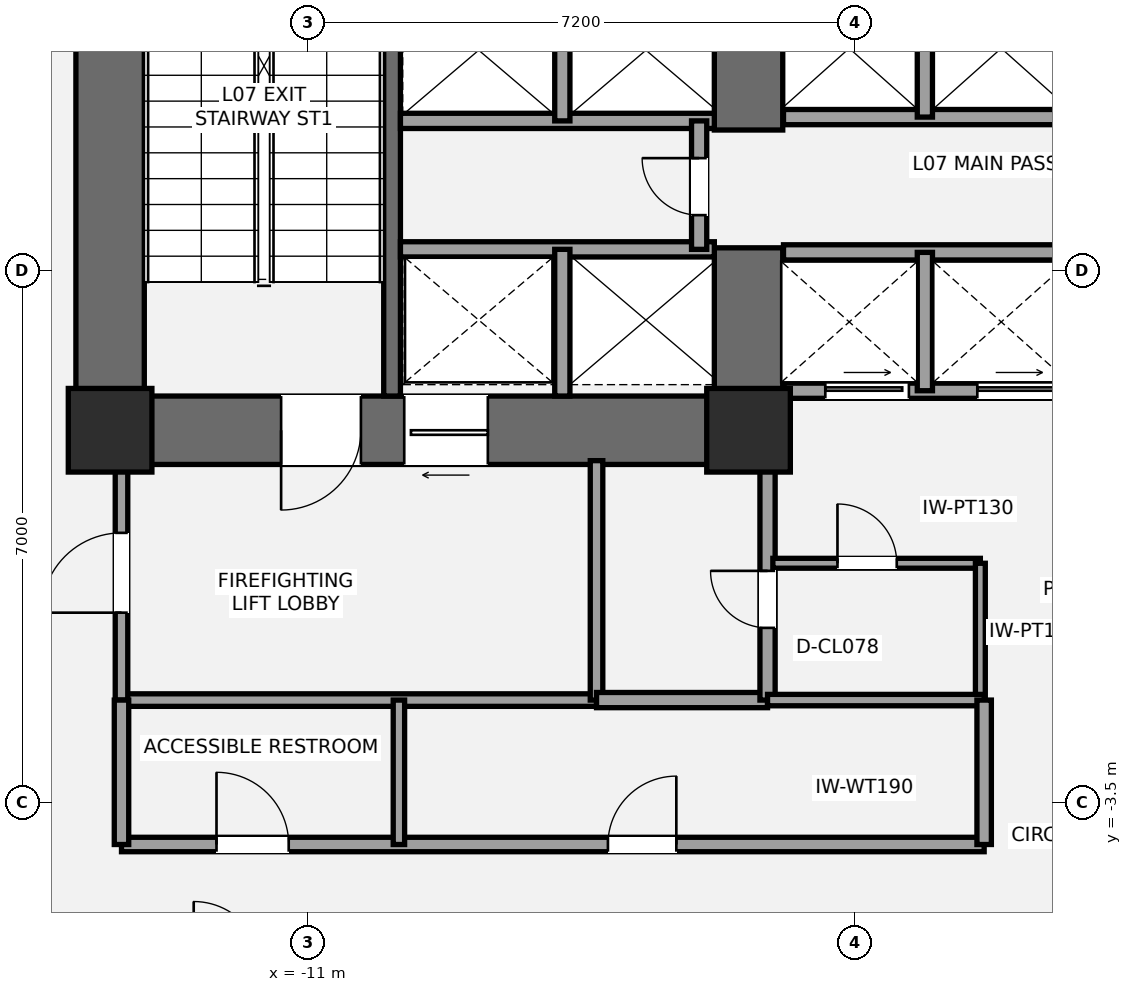
"""IFC4 building model, lengths in metres.
Left out: names, types, materials, properties, quantities, classifications, styles, units other than length and angle.
Written with IfcOpenShell. Run it as: python <this file> out.ifc"""

import sys

from ifc_helpers import new_model, si_unit, direction, frame, frame_2d, origin, origin_2d, place, context, subcontext, project, spatial, rectangle, extrude, element, fill, save


model = new_model("IFC4")
c1 = context("Model", 3, precision=1e-05, world=origin(), true_north=direction((0.0, 1.0)))
c2 = subcontext(c1, "Body", "Model", "MODEL_VIEW")
j1 = project(units=[si_unit("LENGTHUNIT", "METRE"), si_unit("PLANEANGLEUNIT", "RADIAN")], contexts=[c1])
p1 = place(None, origin())
s1 = spatial("IfcSite", under=j1, at=p1, CompositionType="ELEMENT")
p2 = place(p1, origin())
s2 = spatial("IfcBuilding", under=s1, at=p2, CompositionType="ELEMENT")
p3 = place(p2, frame((0.0, 0.0, 30.6)))
s3 = spatial("IfcBuildingStorey", under=s2, at=p3, CompositionType="ELEMENT", Elevation=30.6)
p4 = place(p3, frame((-13.6, 0.95, 0.0), z_axis=(0.0, 0.0, 1.0), x_axis=(0.0, 1.0, 0.0)))
e1 = element("IfcWall", 1, at=p4, inside=s3, PredefinedType="SHEAR", context=c2, shape_type="SweptSolid", body=[
    extrude(rectangle(XDim=8.95, YDim=0.9, at=frame_2d((4.475, 0.0))), origin(), (0.0, 0.0, 1.0), 3.6),
])
p5 = place(p3, frame((-4.75, 1.4, 0.0), z_axis=(0.0, 0.0, 1.0), x_axis=(-1.0, 0.0, 0.0)))
e2 = element("IfcWall", 2, at=p5, inside=s3, PredefinedType="SHEAR", context=c2, shape_type="SweptSolid", body=[
    extrude(rectangle(XDim=9.3, YDim=0.9, at=frame_2d((4.65, 0.0))), origin(), (0.0, 0.0, 1.0), 3.6),
])
p6 = place(p5, frame((5.55, 0.0, 0.0)))
e3 = element("IfcOpeningElement", 3, at=p6, cuts=e2, PredefinedType="OPENING", context=c2, shape_type="SweptSolid", body=[
    extrude(rectangle(XDim=1.05, YDim=2.15, at=frame_2d((0.525, 1.075))), frame((0.0, 0.46, 0.0), z_axis=(0.0, -1.0, 0.0), x_axis=(1.0, 0.0, 0.0)), (0.0, 0.0, 1.0), 0.92),
])
p7 = place(p5, frame((3.88, 0.0, 0.0)))
e4 = element("IfcOpeningElement", 4, at=p7, cuts=e2, PredefinedType="OPENING", context=c2, shape_type="SweptSolid", body=[
    extrude(rectangle(XDim=1.1, YDim=2.2, at=frame_2d((0.55, 1.1))), frame((0.0, 0.46, 0.0), z_axis=(0.0, -1.0, 0.0), x_axis=(1.0, 0.0, 0.0)), (0.0, 0.0, 1.0), 0.92),
])
p8 = place(p3, frame((-5.2, 0.95, 0.0), z_axis=(0.0, 0.0, 1.0), x_axis=(0.0, 1.0, 0.0)))
e5 = element("IfcWall", 5, at=p8, inside=s3, PredefinedType="SHEAR", context=c2, shape_type="SweptSolid", body=[
    extrude(rectangle(XDim=2.85, YDim=0.9, at=frame_2d((1.425, 0.0))), origin(), (0.0, 0.0, 1.0), 3.6),
])
p9 = place(p3, frame((-5.2, 5.35, 0.0), z_axis=(0.0, 0.0, 1.0), x_axis=(0.0, 1.0, 0.0)))
e6 = element("IfcWall", 6, at=p9, inside=s3, PredefinedType="SHEAR", context=c2, shape_type="SweptSolid", body=[
    extrude(rectangle(XDim=2.0, YDim=0.9, at=frame_2d((1.0, 0.0))), origin(), (0.0, 0.0, 1.0), 3.6),
])
p10 = place(p3, frame((-9.89, 1.85, 0.0), z_axis=(0.0, 0.0, 1.0), x_axis=(0.0, 1.0, 0.0)))
e7 = element("IfcWall", 7, at=p10, inside=s3, PredefinedType="SHEAR", context=c2, shape_type="SweptSolid", body=[
    extrude(rectangle(XDim=7.15, YDim=0.22, at=frame_2d((3.575, 0.0))), origin(), (0.0, 0.0, 1.0), 3.6),
])
for number, where, z_axis, x_axis in (
    (8, (-13.6, 1.4, 0.0), (0.0, 0.0, 1.0), (1.0, 0.0, 0.0)),
    (9, (-5.2, 1.4, 0.0), (0.0, 0.0, 1.0), (1.0, 0.0, 0.0)),
):
    element("IfcColumn", number, at=place(p3, frame(where, z_axis=z_axis, x_axis=x_axis)), inside=s3, PredefinedType="COLUMN", context=c2, shape_type="SweptSolid", body=[
        extrude(rectangle(XDim=1.1, YDim=1.1, at=origin_2d()), origin(), (0.0, 0.0, 1.0), 3.6),
    ])
p11 = place(p3, frame((-13.45, -2.15, 0.0), z_axis=(0.0, 0.0, 1.0), x_axis=(1.0, 0.0, 0.0)))
e10 = element("IfcWall", 10, at=p11, inside=s3, PredefinedType="PARTITIONING", context=c2, shape_type="SweptSolid", body=[
    extrude(rectangle(XDim=6.25, YDim=0.165, at=frame_2d((3.125, 0.0))), origin(), (0.0, 0.0, 1.0), 2.853),
])
p12 = place(p3, frame((-13.45, -2.15, 0.0), z_axis=(0.0, 0.0, 1.0), x_axis=(0.0, 1.0, 0.0)))
e11 = element("IfcWall", 11, at=p12, inside=s3, PredefinedType="PARTITIONING", context=c2, shape_type="SweptSolid", body=[
    extrude(rectangle(XDim=3.15, YDim=0.165, at=frame_2d((1.575, 0.0))), origin(), (0.0, 0.0, 1.0), 2.853),
])
p13 = place(p12, frame((1.15, 0.0, 0.0)))
e12 = element("IfcOpeningElement", 12, at=p13, cuts=e11, PredefinedType="OPENING", context=c2, shape_type="SweptSolid", body=[
    extrude(rectangle(XDim=1.05, YDim=2.15, at=frame_2d((0.525, 1.075))), frame((0.0, 0.093, 0.0), z_axis=(0.0, -1.0, 0.0), x_axis=(1.0, 0.0, 0.0)), (0.0, 0.0, 1.0), 0.185),
])
p14 = place(p3, frame((-7.2, -2.15, 0.0), z_axis=(0.0, 0.0, 1.0), x_axis=(0.0, 1.0, 0.0)))
e13 = element("IfcWall", 13, at=p14, inside=s3, PredefinedType="PARTITIONING", context=c2, shape_type="SweptSolid", body=[
    extrude(rectangle(XDim=3.15, YDim=0.165, at=frame_2d((1.575, 0.0))), origin(), (0.0, 0.0, 1.0), 2.853),
])
p15 = place(p3, frame((-7.2, -2.15, 0.0), z_axis=(0.0, 0.0, 1.0), x_axis=(1.0, 0.0, 0.0)))
e14 = element("IfcWall", 14, at=p15, inside=s3, PredefinedType="SOLIDWALL", context=c2, shape_type="SweptSolid", body=[
    extrude(rectangle(XDim=2.25, YDim=0.2, at=frame_2d((1.125, 0.0))), origin(), (0.0, 0.0, 1.0), 3.4),
])
p16 = place(p3, frame((-4.95, -2.15, 0.0), z_axis=(0.0, 0.0, 1.0), x_axis=(0.0, 1.0, 0.0)))
e15 = element("IfcWall", 15, at=p16, inside=s3, PredefinedType="SOLIDWALL", context=c2, shape_type="SweptSolid", body=[
    extrude(rectangle(XDim=3.15, YDim=0.2, at=frame_2d((1.575, 0.0))), origin(), (0.0, 0.0, 1.0), 2.853),
])
p17 = place(p16, frame((0.95, 0.0, 0.0)))
e16 = element("IfcOpeningElement", 16, at=p17, cuts=e15, PredefinedType="OPENING", context=c2, shape_type="SweptSolid", body=[
    extrude(rectangle(XDim=0.75, YDim=2.1, at=frame_2d((0.375, 1.05))), frame((0.0, 0.11, 0.0), z_axis=(0.0, -1.0, 0.0), x_axis=(1.0, 0.0, 0.0)), (0.0, 0.0, 1.0), 0.22),
])
p18 = place(p3, frame((-4.88, -0.35, 0.0), z_axis=(0.0, 0.0, 1.0), x_axis=(1.0, 0.0, 0.0)))
e17 = element("IfcWall", 17, at=p18, inside=s3, PredefinedType="PARTITIONING", context=c2, shape_type="SweptSolid", body=[
    extrude(rectangle(XDim=2.73, YDim=0.13, at=frame_2d((1.365, 0.0))), origin(), (0.0, 0.0, 1.0), 3.4),
])
p19 = place(p18, frame((0.85, 0.0, 0.0)))
e18 = element("IfcOpeningElement", 18, at=p19, cuts=e17, PredefinedType="OPENING", context=c2, shape_type="SweptSolid", body=[
    extrude(rectangle(XDim=0.78, YDim=2.1, at=frame_2d((0.39, 1.05))), frame((0.0, 0.075, 0.0), z_axis=(0.0, -1.0, 0.0), x_axis=(1.0, 0.0, 0.0)), (0.0, 0.0, 1.0), 0.15),
])
p20 = place(p3, frame((-2.15, -2.15, 0.0), z_axis=(0.0, 0.0, 1.0), x_axis=(0.0, 1.0, 0.0)))
e19 = element("IfcWall", 19, at=p20, inside=s3, PredefinedType="PARTITIONING", context=c2, shape_type="SweptSolid", body=[
    extrude(rectangle(XDim=1.8, YDim=0.13, at=frame_2d((0.9, 0.0))), origin(), (0.0, 0.0, 1.0), 3.4),
])
p21 = place(p3, frame((-9.78, 3.78, 0.0), z_axis=(0.0, 0.0, 1.0), x_axis=(1.0, 0.0, 0.0)))
e20 = element("IfcWall", 20, at=p21, inside=s3, PredefinedType="SOLIDWALL", context=c2, shape_type="SweptSolid", body=[
    extrude(rectangle(XDim=4.13, YDim=0.2, at=frame_2d((2.065, 0.0))), origin(), (0.0, 0.0, 1.0), 3.4),
])
p22 = place(p3, frame((-7.65, 1.85, 0.0), z_axis=(0.0, 0.0, 1.0), x_axis=(0.0, 1.0, 0.0)))
e21 = element("IfcWall", 21, at=p22, inside=s3, PredefinedType="SOLIDWALL", context=c2, shape_type="SweptSolid", body=[
    extrude(rectangle(XDim=1.93, YDim=0.2, at=frame_2d((0.965, 0.0))), origin(), (0.0, 0.0, 1.0), 3.4),
])
p23 = place(p3, frame((-9.78, 5.47, 0.0), z_axis=(0.0, 0.0, 1.0), x_axis=(1.0, 0.0, 0.0)))
e22 = element("IfcWall", 22, at=p23, inside=s3, PredefinedType="SOLIDWALL", context=c2, shape_type="SweptSolid", body=[
    extrude(rectangle(XDim=4.13, YDim=0.2, at=frame_2d((2.065, 0.0))), origin(), (0.0, 0.0, 1.0), 3.4),
])
p24 = place(p3, frame((-7.65, 5.47, 0.0), z_axis=(0.0, 0.0, 1.0), x_axis=(0.0, 1.0, 0.0)))
e23 = element("IfcWall", 23, at=p24, inside=s3, PredefinedType="SOLIDWALL", context=c2, shape_type="SweptSolid", body=[
    extrude(rectangle(XDim=1.86, YDim=0.2, at=frame_2d((0.93, 0.0))), origin(), (0.0, 0.0, 1.0), 3.4),
])
p25 = place(p3, frame((-5.85, 3.78, 0.0), z_axis=(0.0, 0.0, 1.0), x_axis=(0.0, 1.0, 0.0)))
e24 = element("IfcWall", 24, at=p25, inside=s3, PredefinedType="SOLIDWALL", context=c2, shape_type="SweptSolid", body=[
    extrude(rectangle(XDim=1.69, YDim=0.2, at=frame_2d((0.845, 0.0))), origin(), (0.0, 0.0, 1.0), 3.4),
])
p26 = place(p25, frame((0.45, 0.0, 0.0)))
e25 = element("IfcOpeningElement", 25, at=p26, cuts=e24, PredefinedType="OPENING", context=c2, shape_type="SweptSolid", body=[
    extrude(rectangle(XDim=0.75, YDim=2.1, at=frame_2d((0.375, 1.05))), frame((0.0, 0.11, 0.0), z_axis=(0.0, -1.0, 0.0), x_axis=(1.0, 0.0, 0.0)), (0.0, 0.0, 1.0), 0.22),
])
p27 = place(p3, frame((-4.74, 1.92, 0.0), z_axis=(0.0, 0.0, 1.0), x_axis=(1.0, 0.0, 0.0)))
e26 = element("IfcWall", 26, at=p27, inside=s3, PredefinedType="SOLIDWALL", context=c2, shape_type="SweptSolid", body=[
    extrude(rectangle(XDim=3.86, YDim=0.2, at=frame_2d((1.93, 0.0))), origin(), (0.0, 0.0, 1.0), 2.39),
])
p28 = place(p27, frame((0.55, 0.0, 0.0)))
e27 = element("IfcOpeningElement", 27, at=p28, cuts=e26, PredefinedType="OPENING", context=c2, shape_type="SweptSolid", body=[
    extrude(rectangle(XDim=1.1, YDim=2.2, at=frame_2d((0.55, 1.1))), frame((0.0, 0.11, 0.0), z_axis=(0.0, -1.0, 0.0), x_axis=(1.0, 0.0, 0.0)), (0.0, 0.0, 1.0), 0.22),
])
p29 = place(p27, frame((2.55, 0.0, 0.0)))
e28 = element("IfcOpeningElement", 28, at=p29, cuts=e26, PredefinedType="OPENING", context=c2, shape_type="SweptSolid", body=[
    extrude(rectangle(XDim=1.1, YDim=2.2, at=frame_2d((0.55, 1.1))), frame((0.0, 0.11, 0.0), z_axis=(0.0, -1.0, 0.0), x_axis=(1.0, 0.0, 0.0)), (0.0, 0.0, 1.0), 0.22),
])
p30 = place(p3, frame((-4.74, 3.74, 0.0), z_axis=(0.0, 0.0, 1.0), x_axis=(1.0, 0.0, 0.0)))
e29 = element("IfcWall", 29, at=p30, inside=s3, PredefinedType="SOLIDWALL", context=c2, shape_type="SweptSolid", body=[
    extrude(rectangle(XDim=3.86, YDim=0.2, at=frame_2d((1.93, 0.0))), origin(), (0.0, 0.0, 1.0), 3.4),
])
p31 = place(p3, frame((-2.88, 1.92, 0.0), z_axis=(0.0, 0.0, 1.0), x_axis=(0.0, 1.0, 0.0)))
e30 = element("IfcWall", 30, at=p31, inside=s3, PredefinedType="SOLIDWALL", context=c2, shape_type="SweptSolid", body=[
    extrude(rectangle(XDim=1.82, YDim=0.2, at=frame_2d((0.91, 0.0))), origin(), (0.0, 0.0, 1.0), 3.4),
])
p32 = place(p3, frame((-4.74, 5.52, 0.0), z_axis=(0.0, 0.0, 1.0), x_axis=(1.0, 0.0, 0.0)))
e31 = element("IfcWall", 31, at=p32, inside=s3, PredefinedType="SOLIDWALL", context=c2, shape_type="SweptSolid", body=[
    extrude(rectangle(XDim=3.86, YDim=0.2, at=frame_2d((1.93, 0.0))), origin(), (0.0, 0.0, 1.0), 3.4),
])
p33 = place(p3, frame((-2.88, 5.52, 0.0), z_axis=(0.0, 0.0, 1.0), x_axis=(0.0, 1.0, 0.0)))
e32 = element("IfcWall", 32, at=p33, inside=s3, PredefinedType="SOLIDWALL", context=c2, shape_type="SweptSolid", body=[
    extrude(rectangle(XDim=1.81, YDim=0.2, at=frame_2d((0.905, 0.0))), origin(), (0.0, 0.0, 1.0), 3.4),
])
p34 = place(p3, frame((-13.45, -4.05, 0.0), z_axis=(0.0, 0.0, 1.0), x_axis=(1.0, 0.0, 0.0)))
e33 = element("IfcWall", 33, at=p34, inside=s3, PredefinedType="PLUMBINGWALL", context=c2, shape_type="SweptSolid", body=[
    extrude(rectangle(XDim=11.35, YDim=0.19, at=frame_2d((5.675, 0.0))), origin(), (0.0, 0.0, 1.0), 2.933),
])
p35 = place(p34, frame((1.25, 0.0, 0.0)))
e34 = element("IfcOpeningElement", 34, at=p35, cuts=e33, PredefinedType="OPENING", context=c2, shape_type="SweptSolid", body=[
    extrude(rectangle(XDim=0.95, YDim=2.15, at=frame_2d((0.475, 1.075))), frame((0.0, 0.105, 0.0), z_axis=(0.0, -1.0, 0.0), x_axis=(1.0, 0.0, 0.0)), (0.0, 0.0, 1.0), 0.21),
])
p36 = place(p34, frame((6.4, 0.0, 0.0)))
e35 = element("IfcOpeningElement", 35, at=p36, cuts=e33, PredefinedType="OPENING", context=c2, shape_type="SweptSolid", body=[
    extrude(rectangle(XDim=0.9, YDim=2.1, at=frame_2d((0.45, 1.05))), frame((0.0, 0.105, 0.0), z_axis=(0.0, -1.0, 0.0), x_axis=(1.0, 0.0, 0.0)), (0.0, 0.0, 1.0), 0.21),
])
p37 = place(p3, frame((-4.95, -2.15, 0.0), z_axis=(0.0, 0.0, 1.0), x_axis=(1.0, 0.0, 0.0)))
e36 = element("IfcWall", 36, at=p37, inside=s3, PredefinedType="PLUMBINGWALL", context=c2, shape_type="SweptSolid", body=[
    extrude(rectangle(XDim=2.85, YDim=0.15, at=frame_2d((1.425, 0.0))), origin(), (0.0, 0.0, 1.0), 3.4),
])
p38 = place(p3, frame((-13.45, -4.05, 0.0), z_axis=(0.0, 0.0, 1.0), x_axis=(0.0, 1.0, 0.0)))
e37 = element("IfcWall", 37, at=p38, inside=s3, PredefinedType="PLUMBINGWALL", context=c2, shape_type="SweptSolid", body=[
    extrude(rectangle(XDim=1.9, YDim=0.19, at=frame_2d((0.95, 0.0))), origin(), (0.0, 0.0, 1.0), 2.853),
])
p39 = place(p3, frame((-2.1, -4.05, 0.0), z_axis=(0.0, 0.0, 1.0), x_axis=(0.0, 1.0, 0.0)))
e38 = element("IfcWall", 38, at=p39, inside=s3, PredefinedType="PLUMBINGWALL", context=c2, shape_type="SweptSolid", body=[
    extrude(rectangle(XDim=1.9, YDim=0.19, at=frame_2d((0.95, 0.0))), origin(), (0.0, 0.0, 1.0), 3.4),
])
p40 = place(p3, frame((-9.8, -4.05, 0.0), z_axis=(0.0, 0.0, 1.0), x_axis=(0.0, 1.0, 0.0)))
e39 = element("IfcWall", 39, at=p40, inside=s3, PredefinedType="PLUMBINGWALL", context=c2, shape_type="SweptSolid", body=[
    extrude(rectangle(XDim=1.9, YDim=0.15, at=frame_2d((0.95, 0.0))), origin(), (0.0, 0.0, 1.0), 2.853),
])
p41 = place(p6, origin())
e40 = element("IfcDoor", 40, at=p41, inside=s3, OperationType="SINGLE_SWING_RIGHT", PredefinedType="DOOR", context=c2, shape_type="SweptSolid", body=[
    extrude(rectangle(XDim=1.05, YDim=2.15, at=frame_2d((0.525, 1.075))), frame((0.0, 0.025, 0.0), z_axis=(0.0, -1.0, 0.0), x_axis=(1.0, 0.0, 0.0)), (0.0, 0.0, 1.0), 0.05),
])
fill(e3, e40)
p42 = place(p13, origin())
e41 = element("IfcDoor", 41, at=p42, inside=s3, OperationType="SINGLE_SWING_LEFT", PredefinedType="DOOR", context=c2, shape_type="SweptSolid", body=[
    extrude(rectangle(XDim=1.05, YDim=2.15, at=frame_2d((0.525, 1.075))), frame((0.0, 0.025, 0.0), z_axis=(0.0, -1.0, 0.0), x_axis=(1.0, 0.0, 0.0)), (0.0, 0.0, 1.0), 0.05),
])
fill(e12, e41)
p43 = place(p17, origin())
e42 = element("IfcDoor", 42, at=p43, inside=s3, OperationType="SINGLE_SWING_RIGHT", PredefinedType="DOOR", context=c2, shape_type="SweptSolid", body=[
    extrude(rectangle(XDim=0.75, YDim=2.1, at=frame_2d((0.375, 1.05))), frame((0.0, 0.025, 0.0), z_axis=(0.0, -1.0, 0.0), x_axis=(1.0, 0.0, 0.0)), (0.0, 0.0, 1.0), 0.05),
])
fill(e16, e42)
p44 = place(p19, origin())
e43 = element("IfcDoor", 43, at=p44, inside=s3, OperationType="SINGLE_SWING_LEFT", PredefinedType="DOOR", context=c2, shape_type="SweptSolid", body=[
    extrude(rectangle(XDim=0.78, YDim=2.1, at=frame_2d((0.39, 1.05))), frame((0.0, 0.025, 0.0), z_axis=(0.0, -1.0, 0.0), x_axis=(1.0, 0.0, 0.0)), (0.0, 0.0, 1.0), 0.05),
])
fill(e18, e43)
p45 = place(p7, origin())
e44 = element("IfcDoor", 44, at=p45, inside=s3, OperationType="SLIDING_TO_LEFT", PredefinedType="DOOR", context=c2, shape_type="SweptSolid", body=[
    extrude(rectangle(XDim=1.1, YDim=2.2, at=frame_2d((0.55, 1.1))), frame((0.0, 0.025, 0.0), z_axis=(0.0, -1.0, 0.0), x_axis=(1.0, 0.0, 0.0)), (0.0, 0.0, 1.0), 0.05),
])
fill(e4, e44)
p46 = place(p26, origin())
e45 = element("IfcDoor", 45, at=p46, inside=s3, OperationType="SINGLE_SWING_RIGHT", PredefinedType="DOOR", context=c2, shape_type="SweptSolid", body=[
    extrude(rectangle(XDim=0.75, YDim=2.1, at=frame_2d((0.375, 1.05))), frame((0.0, 0.025, 0.0), z_axis=(0.0, -1.0, 0.0), x_axis=(1.0, 0.0, 0.0)), (0.0, 0.0, 1.0), 0.05),
])
fill(e25, e45)
p47 = place(p28, origin())
e46 = element("IfcDoor", 46, at=p47, inside=s3, OperationType="SLIDING_TO_LEFT", PredefinedType="DOOR", context=c2, shape_type="SweptSolid", body=[
    extrude(rectangle(XDim=1.1, YDim=2.2, at=frame_2d((0.55, 1.1))), frame((0.0, 0.025, 0.0), z_axis=(0.0, -1.0, 0.0), x_axis=(1.0, 0.0, 0.0)), (0.0, 0.0, 1.0), 0.05),
])
fill(e27, e46)
p48 = place(p29, origin())
e47 = element("IfcDoor", 47, at=p48, inside=s3, OperationType="SLIDING_TO_LEFT", PredefinedType="DOOR", context=c2, shape_type="SweptSolid", body=[
    extrude(rectangle(XDim=1.1, YDim=2.2, at=frame_2d((0.55, 1.1))), frame((0.0, 0.025, 0.0), z_axis=(0.0, -1.0, 0.0), x_axis=(1.0, 0.0, 0.0)), (0.0, 0.0, 1.0), 0.05),
])
fill(e28, e47)
p49 = place(p35, origin())
e48 = element("IfcDoor", 48, at=p49, inside=s3, OperationType="SINGLE_SWING_LEFT", PredefinedType="DOOR", context=c2, shape_type="SweptSolid", body=[
    extrude(rectangle(XDim=0.95, YDim=2.15, at=frame_2d((0.475, 1.075))), frame((0.0, 0.025, 0.0), z_axis=(0.0, -1.0, 0.0), x_axis=(1.0, 0.0, 0.0)), (0.0, 0.0, 1.0), 0.05),
])
fill(e34, e48)
p50 = place(p36, origin())
e49 = element("IfcDoor", 49, at=p50, inside=s3, OperationType="SINGLE_SWING_RIGHT", PredefinedType="DOOR", context=c2, shape_type="SweptSolid", body=[
    extrude(rectangle(XDim=0.9, YDim=2.1, at=frame_2d((0.45, 1.05))), frame((0.0, 0.025, 0.0), z_axis=(0.0, -1.0, 0.0), x_axis=(1.0, 0.0, 0.0)), (0.0, 0.0, 1.0), 0.05),
])
fill(e35, e49)
save(model, sys.argv[1])
